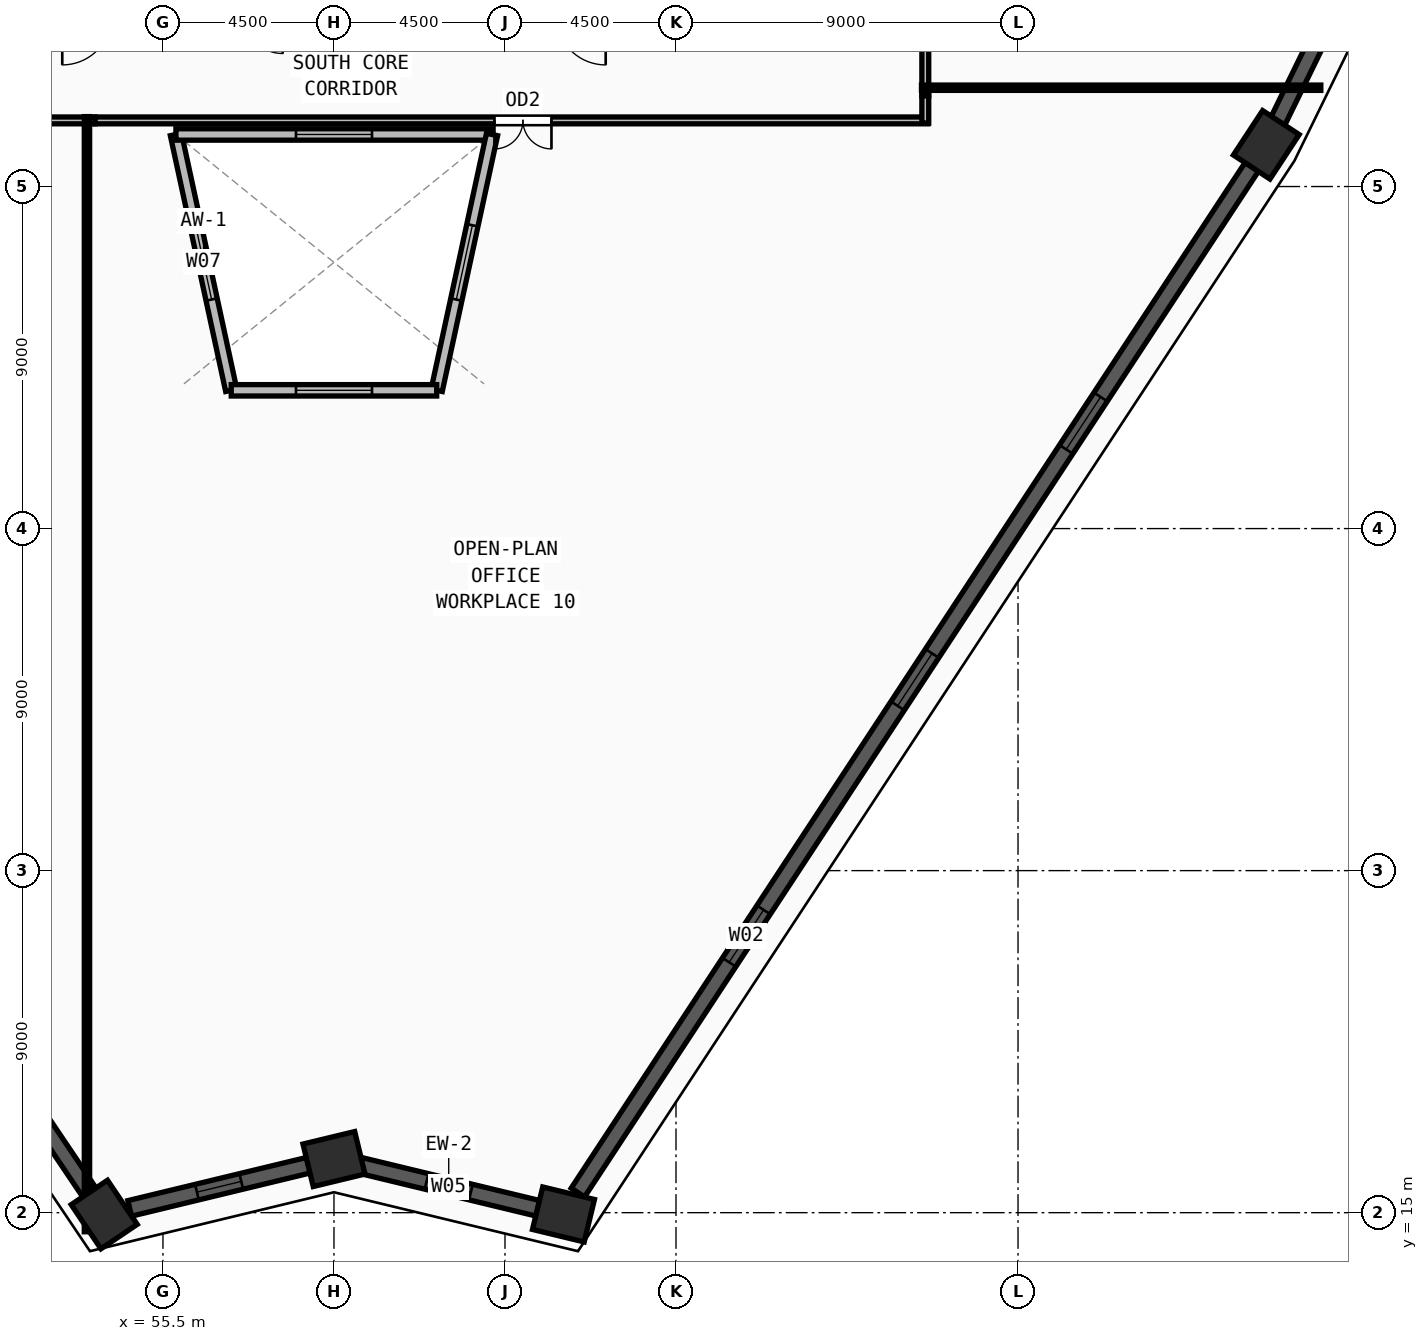
"""IFC4 building model, lengths in metres.
Left out: names, types, materials, properties, quantities, classifications, styles, units other than length and angle.
Written with IfcOpenShell. Run it as: python <this file> out.ifc"""

import sys

from ifc_helpers import new_model, si_unit, direction, frame, frame_2d, origin, origin_2d, place, context, subcontext, project, spatial, rectangle, extrude, source, transform, mapped, element, fill, save


model = new_model("IFC4")
c1 = context("Model", 3, precision=1e-05, world=origin(), true_north=direction((0.0, 1.0)))
c2 = subcontext(c1, "Body", "Model", "MODEL_VIEW")
j1 = project(units=[si_unit("LENGTHUNIT", "METRE"), si_unit("PLANEANGLEUNIT", "RADIAN")], contexts=[c1])
p1 = place(None, origin())
s1 = spatial("IfcSite", under=j1, at=p1, CompositionType="ELEMENT")
p2 = place(p1, origin())
s2 = spatial("IfcBuilding", under=s1, at=p2, CompositionType="ELEMENT")
p3 = place(p2, frame((0.0, 0.0, 102.0)))
s3 = spatial("IfcBuildingStorey", under=s2, at=p3, CompositionType="ELEMENT", Elevation=102.0)
m1 = source(origin(), c2, "Body", "SweptSolid", [
    extrude(rectangle(XDim=1.4, YDim=1.15, at=origin_2d()), origin(), (0.0, 0.0, 1.0), 3.75),
])
for number, where, z_axis, x_axis in (
    (1, (53.954, 14.951, 0.0), (0.0, 0.0, 1.0), (-0.559, 0.829, 0.0)),
    (2, (84.533, 43.098, 0.0), (0.0, 0.0, 1.0), (0.549, 0.836, 0.0)),
    (3, (66.039, 14.953, 0.0), (0.0, 0.0, 1.0), (-0.972, 0.235, 0.0)),
    (4, (60.0, 16.411, 0.0), (0.0, 0.0, 1.0), (0.972, 0.235, 0.0)),
):
    element("IfcColumn", number, at=place(p3, frame(where, z_axis=z_axis, x_axis=x_axis)), inside=s3, PredefinedType="COLUMN", context=c2, shape_type="MappedRepresentation", body=[
        mapped(m1, transform((0.0, 0.0, 0.0), x_axis=(1.0, 0.0, 0.0), y_axis=(0.0, 1.0, 0.0), z_axis=(0.0, 0.0, 1.0), scale=1.0)),
    ])
p4 = place(p3, frame((60.671, 16.249, 0.0), z_axis=(0.0, 0.0, 1.0), x_axis=(0.972069490492, -0.234693216037, 0.0)))
e5 = element("IfcWall", 5, at=p4, inside=s3, PredefinedType="SOLIDWALL", context=c2, shape_type="SweptSolid", body=[
    extrude(rectangle(XDim=4.832, YDim=0.42, at=frame_2d((2.416, 0.0))), origin(), (0.0, 0.0, 1.0), 3.57),
])
m2 = source(origin(), c2, "Body", "SweptSolid", [
    extrude(rectangle(XDim=1.2, YDim=1.9, at=frame_2d((0.6, 0.95))), frame((0.0, 0.22, 0.0), z_axis=(0.0, -1.0, 0.0), x_axis=(1.0, 0.0, 0.0)), (0.0, 0.0, 1.0), 0.44),
])
p5 = place(p4, frame((1.816, 0.0, 0.55)))
e6 = element("IfcOpeningElement", 6, at=p5, cuts=e5, PredefinedType="OPENING", context=c2, shape_type="MappedRepresentation", body=[
    mapped(m2, transform((0.0, 0.0, 0.0), x_axis=(1.0, 0.0, 0.0), y_axis=(0.0, 1.0, 0.0), z_axis=(0.0, 0.0, 1.0), scale=1.0)),
])
p6 = place(p3, frame((66.418, 15.53, 0.0), z_axis=(0.0, 0.0, 1.0), x_axis=(0.549159785608, 0.835717374398, 0.0)))
e7 = element("IfcWall", 7, at=p6, inside=s3, PredefinedType="SOLIDWALL", context=c2, shape_type="SweptSolid", body=[
    extrude(rectangle(XDim=32.297, YDim=0.42, at=frame_2d((16.148, 0.0))), origin(), (0.0, 0.0, 1.0), 3.57),
])
m3 = source(origin(), c2, "Body", "SweptSolid", [
    extrude(rectangle(XDim=1.65, YDim=1.95, at=frame_2d((0.825, 0.975))), frame((0.0, 0.22, 0.0), z_axis=(0.0, -1.0, 0.0), x_axis=(1.0, 0.0, 0.0)), (0.0, 0.0, 1.0), 0.44),
])
p7 = place(p6, frame((7.249, 0.0, 0.55)))
e8 = element("IfcOpeningElement", 8, at=p7, cuts=e7, PredefinedType="OPENING", context=c2, shape_type="MappedRepresentation", body=[
    mapped(m3, transform((0.0, 0.0, 0.0), x_axis=(1.0, 0.0, 0.0), y_axis=(0.0, 1.0, 0.0), z_axis=(0.0, 0.0, 1.0), scale=1.0)),
])
p8 = place(p6, frame((15.323, 0.0, 0.55)))
e9 = element("IfcOpeningElement", 9, at=p8, cuts=e7, PredefinedType="OPENING", context=c2, shape_type="MappedRepresentation", body=[
    mapped(m3, transform((0.0, 0.0, 0.0), x_axis=(1.0, 0.0, 0.0), y_axis=(0.0, 1.0, 0.0), z_axis=(0.0, 0.0, 1.0), scale=1.0)),
])
p9 = place(p6, frame((23.398, 0.0, 0.55)))
e10 = element("IfcOpeningElement", 10, at=p9, cuts=e7, PredefinedType="OPENING", context=c2, shape_type="MappedRepresentation", body=[
    mapped(m3, transform((0.0, 0.0, 0.0), x_axis=(1.0, 0.0, 0.0), y_axis=(0.0, 1.0, 0.0), z_axis=(0.0, 0.0, 1.0), scale=1.0)),
])
p10 = place(p3, frame((84.836, 43.718, 0.0), z_axis=(0.0, 0.0, 1.0), x_axis=(0.439006754844, 0.898483761234, 0.0)))
e11 = element("IfcWall", 11, at=p10, inside=s3, PredefinedType="SOLIDWALL", context=c2, shape_type="SweptSolid", body=[
    extrude(rectangle(XDim=26.656, YDim=0.42, at=frame_2d((13.328, 0.0))), origin(), (0.0, 0.0, 1.0), 3.57),
])
p11 = place(p10, frame((7.389, 0.0, 0.55)))
e12 = element("IfcOpeningElement", 12, at=p11, cuts=e11, PredefinedType="OPENING", context=c2, shape_type="MappedRepresentation", body=[
    mapped(m3, transform((0.0, 0.0, 0.0), x_axis=(1.0, 0.0, 0.0), y_axis=(0.0, 1.0, 0.0), z_axis=(0.0, 0.0, 1.0), scale=1.0)),
])
p12 = place(p10, frame((19.167, 0.0, 0.55)))
e13 = element("IfcOpeningElement", 13, at=p12, cuts=e11, PredefinedType="OPENING", context=c2, shape_type="MappedRepresentation", body=[
    mapped(m3, transform((0.0, 0.0, 0.0), x_axis=(1.0, 0.0, 0.0), y_axis=(0.0, 1.0, 0.0), z_axis=(0.0, 0.0, 1.0), scale=1.0)),
])
p13 = place(p3, frame((38.677, 37.633, 0.0), z_axis=(0.0, 0.0, 1.0), x_axis=(0.558641911568, -0.829408955004, 0.0)))
e14 = element("IfcWall", 14, at=p13, inside=s3, PredefinedType="SOLIDWALL", context=c2, shape_type="SweptSolid", body=[
    extrude(rectangle(XDim=26.658, YDim=0.42, at=frame_2d((13.329, 0.0))), origin(), (0.0, 0.0, 1.0), 3.57),
])
p14 = place(p13, frame((5.839, 0.0, 0.55)))
e15 = element("IfcOpeningElement", 15, at=p14, cuts=e14, PredefinedType="OPENING", context=c2, shape_type="MappedRepresentation", body=[
    mapped(m3, transform((0.0, 0.0, 0.0), x_axis=(1.0, 0.0, 0.0), y_axis=(0.0, 1.0, 0.0), z_axis=(0.0, 0.0, 1.0), scale=1.0)),
])
p15 = place(p13, frame((12.504, 0.0, 0.55)))
e16 = element("IfcOpeningElement", 16, at=p15, cuts=e14, PredefinedType="OPENING", context=c2, shape_type="MappedRepresentation", body=[
    mapped(m3, transform((0.0, 0.0, 0.0), x_axis=(1.0, 0.0, 0.0), y_axis=(0.0, 1.0, 0.0), z_axis=(0.0, 0.0, 1.0), scale=1.0)),
])
p16 = place(p13, frame((19.168, 0.0, 0.55)))
e17 = element("IfcOpeningElement", 17, at=p16, cuts=e14, PredefinedType="OPENING", context=c2, shape_type="MappedRepresentation", body=[
    mapped(m3, transform((0.0, 0.0, 0.0), x_axis=(1.0, 0.0, 0.0), y_axis=(0.0, 1.0, 0.0), z_axis=(0.0, 0.0, 1.0), scale=1.0)),
])
p17 = place(p3, frame((54.625, 15.113, 0.0), z_axis=(0.0, 0.0, 1.0), x_axis=(0.972057999052, 0.234740807016, 0.0)))
e18 = element("IfcWall", 18, at=p17, inside=s3, PredefinedType="SOLIDWALL", context=c2, shape_type="SweptSolid", body=[
    extrude(rectangle(XDim=4.839, YDim=0.42, at=frame_2d((2.42, 0.0))), origin(), (0.0, 0.0, 1.0), 3.57),
])
p18 = place(p17, frame((1.82, 0.0, 0.55)))
e19 = element("IfcOpeningElement", 19, at=p18, cuts=e18, PredefinedType="OPENING", context=c2, shape_type="MappedRepresentation", body=[
    mapped(m2, transform((0.0, 0.0, 0.0), x_axis=(1.0, 0.0, 0.0), y_axis=(0.0, 1.0, 0.0), z_axis=(0.0, 0.0, 1.0), scale=1.0)),
])
p19 = place(p3, frame((57.297, 36.638, 0.0), z_axis=(0.0, 0.0, 1.0), x_axis=(-0.211395025219, 0.977400707649, 0.0)))
e20 = element("IfcWall", 20, at=p19, inside=s3, PredefinedType="SOLIDWALL", context=c2, shape_type="SweptSolid", body=[
    extrude(rectangle(XDim=6.888, YDim=0.3, at=frame_2d((3.444, 0.0))), origin(), (0.0, 0.0, 1.0), 3.57),
])
m4 = source(origin(), c2, "Body", "SweptSolid", [
    extrude(rectangle(XDim=2.0, YDim=1.9, at=frame_2d((1.0, 0.95))), frame((0.0, 0.16, 0.0), z_axis=(0.0, -1.0, 0.0), x_axis=(1.0, 0.0, 0.0)), (0.0, 0.0, 1.0), 0.32),
])
p20 = place(p19, frame((2.444, 0.0, 0.55)))
e21 = element("IfcOpeningElement", 21, at=p20, cuts=e20, PredefinedType="OPENING", context=c2, shape_type="MappedRepresentation", body=[
    mapped(m4, transform((0.0, 0.0, 0.0), x_axis=(1.0, 0.0, 0.0), y_axis=(0.0, 1.0, 0.0), z_axis=(0.0, 0.0, 1.0), scale=1.0)),
])
p21 = place(p3, frame((55.841, 43.37, 0.0), z_axis=(0.0, 0.0, 1.0), x_axis=(1.0, 0.0, 0.0)))
e22 = element("IfcWall", 22, at=p21, inside=s3, PredefinedType="SOLIDWALL", context=c2, shape_type="SweptSolid", body=[
    extrude(rectangle(XDim=8.318, YDim=0.3, at=frame_2d((4.159, 0.0))), origin(), (0.0, 0.0, 1.0), 3.57),
])
p22 = place(p21, frame((3.159, 0.0, 0.55)))
e23 = element("IfcOpeningElement", 23, at=p22, cuts=e22, PredefinedType="OPENING", context=c2, shape_type="MappedRepresentation", body=[
    mapped(m4, transform((0.0, 0.0, 0.0), x_axis=(1.0, 0.0, 0.0), y_axis=(0.0, 1.0, 0.0), z_axis=(0.0, 0.0, 1.0), scale=1.0)),
])
p23 = place(p3, frame((64.159, 43.37, 0.0), z_axis=(0.0, 0.0, 1.0), x_axis=(-0.211395025219, -0.977400707649, 0.0)))
e24 = element("IfcWall", 24, at=p23, inside=s3, PredefinedType="SOLIDWALL", context=c2, shape_type="SweptSolid", body=[
    extrude(rectangle(XDim=6.888, YDim=0.3, at=frame_2d((3.444, 0.0))), origin(), (0.0, 0.0, 1.0), 3.57),
])
p24 = place(p23, frame((2.444, 0.0, 0.55)))
e25 = element("IfcOpeningElement", 25, at=p24, cuts=e24, PredefinedType="OPENING", context=c2, shape_type="MappedRepresentation", body=[
    mapped(m4, transform((0.0, 0.0, 0.0), x_axis=(1.0, 0.0, 0.0), y_axis=(0.0, 1.0, 0.0), z_axis=(0.0, 0.0, 1.0), scale=1.0)),
])
p25 = place(p3, frame((62.703, 36.638, 0.0), z_axis=(0.0, 0.0, 1.0), x_axis=(-1.0, 0.0, 0.0)))
e26 = element("IfcWall", 26, at=p25, inside=s3, PredefinedType="SOLIDWALL", context=c2, shape_type="SweptSolid", body=[
    extrude(rectangle(XDim=5.406, YDim=0.3, at=frame_2d((2.703, 0.0))), origin(), (0.0, 0.0, 1.0), 3.57),
])
p26 = place(p25, frame((1.703, 0.0, 0.55)))
e27 = element("IfcOpeningElement", 27, at=p26, cuts=e26, PredefinedType="OPENING", context=c2, shape_type="MappedRepresentation", body=[
    mapped(m4, transform((0.0, 0.0, 0.0), x_axis=(1.0, 0.0, 0.0), y_axis=(0.0, 1.0, 0.0), z_axis=(0.0, 0.0, 1.0), scale=1.0)),
])
p27 = place(p3, frame((53.715, 43.74, 0.0), z_axis=(0.0, 0.0, 1.0), x_axis=(-1.0, 0.0, 0.0)))
e28 = element("IfcWall", 28, at=p27, inside=s3, PredefinedType="PARTITIONING", context=c2, shape_type="SweptSolid", body=[
    extrude(rectangle(XDim=9.345, YDim=0.18, at=frame_2d((4.672, 0.0))), origin(), (0.0, 0.0, 1.0), 3.57),
])
m5 = source(origin(), c2, "Body", "SweptSolid", [
    extrude(rectangle(XDim=1.5, YDim=2.2, at=frame_2d((0.75, 1.1))), frame((0.0, 0.1, 0.0), z_axis=(0.0, -1.0, 0.0), x_axis=(1.0, 0.0, 0.0)), (0.0, 0.0, 1.0), 0.2),
])
p28 = place(p27, frame((3.923, 0.0, 0.0)))
e29 = element("IfcOpeningElement", 29, at=p28, cuts=e28, PredefinedType="OPENING", context=c2, shape_type="MappedRepresentation", body=[
    mapped(m5, transform((0.0, 0.0, 0.0), x_axis=(1.0, 0.0, 0.0), y_axis=(0.0, 1.0, 0.0), z_axis=(0.0, 0.0, 1.0), scale=1.0)),
])
p29 = place(p3, frame((75.63, 43.74, 0.0), z_axis=(0.0, 0.0, 1.0), x_axis=(-1.0, 0.0, 0.0)))
e30 = element("IfcWall", 30, at=p29, inside=s3, PredefinedType="PARTITIONING", context=c2, shape_type="SweptSolid", body=[
    extrude(rectangle(XDim=21.915, YDim=0.18, at=frame_2d((10.958, 0.0))), origin(), (0.0, 0.0, 1.0), 3.57),
])
p30 = place(p29, frame((9.907, 0.0, 0.0)))
e31 = element("IfcOpeningElement", 31, at=p30, cuts=e30, PredefinedType="OPENING", context=c2, shape_type="MappedRepresentation", body=[
    mapped(m5, transform((0.0, 0.0, 0.0), x_axis=(1.0, 0.0, 0.0), y_axis=(0.0, 1.0, 0.0), z_axis=(0.0, 0.0, 1.0), scale=1.0)),
])
p31 = place(p3, frame((75.56, 49.215, 0.0), z_axis=(0.0, 0.0, 1.0), x_axis=(0.0, -1.0, 0.0)))
e32 = element("IfcWall", 32, at=p31, inside=s3, PredefinedType="PARTITIONING", context=c2, shape_type="SweptSolid", body=[
    extrude(rectangle(XDim=4.83, YDim=0.18, at=frame_2d((2.415, 0.0))), origin(), (0.0, 0.0, 1.0), 3.57),
])
m6 = source(origin(), c2, "Body", "SweptSolid", [
    extrude(rectangle(XDim=1.0, YDim=2.2, at=frame_2d((0.5, 1.1))), frame((0.0, 0.1, 0.0), z_axis=(0.0, -1.0, 0.0), x_axis=(1.0, 0.0, 0.0)), (0.0, 0.0, 1.0), 0.2),
])
p32 = place(p31, frame((1.915, 0.0, 0.0)))
e33 = element("IfcOpeningElement", 33, at=p32, cuts=e32, PredefinedType="OPENING", context=c2, shape_type="MappedRepresentation", body=[
    mapped(m6, transform((0.0, 0.0, 0.0), x_axis=(1.0, 0.0, 0.0), y_axis=(0.0, 1.0, 0.0), z_axis=(0.0, 0.0, 1.0), scale=1.0)),
])
p33 = place(p3, frame((75.56, 44.385, 0.0), z_axis=(0.0, 0.0, 1.0), x_axis=(0.0, -1.0, 0.0)))
e34 = element("IfcWall", 34, at=p33, inside=s3, PredefinedType="PARTITIONING", context=c2, shape_type="SweptSolid", body=[
    extrude(rectangle(XDim=0.715, YDim=0.18, at=frame_2d((0.357, 0.0))), origin(), (0.0, 0.0, 1.0), 3.57),
])
p34 = place(p3, frame((75.46, 44.6, 0.0), z_axis=(0.0, 0.0, 1.0), x_axis=(1.0, 0.0, 0.0)))
e35 = element("IfcWall", 35, at=p34, inside=s3, PredefinedType="PARTITIONING", context=c2, shape_type="SweptSolid", body=[
    extrude(rectangle(XDim=10.508, YDim=0.14, at=frame_2d((5.254, 0.0))), origin(), (0.0, 0.0, 1.0), 3.57),
])
p35 = place(p3, frame((53.5, 43.84, 0.0), z_axis=(0.0, 0.0, 1.0), x_axis=(0.0, -1.0, 0.0)))
e36 = element("IfcWall", 36, at=p35, inside=s3, PredefinedType="PARTITIONING", context=c2, shape_type="SweptSolid", body=[
    extrude(rectangle(XDim=29.343, YDim=0.14, at=frame_2d((14.671, 0.0))), origin(), (0.0, 0.0, 1.0), 2.755),
])
m7 = source(origin(), c2, "Body", "SweptSolid", [
    extrude(rectangle(XDim=1.2, YDim=1.9, at=frame_2d((0.6, 0.95))), frame((0.0, 0.03, 0.0), z_axis=(0.0, -1.0, 0.0), x_axis=(1.0, 0.0, 0.0)), (0.0, 0.0, 1.0), 0.06),
])
p36 = place(p5, origin())
e37 = element("IfcWindow", 37, at=p36, inside=s3, PartitioningType="SINGLE_PANEL", PredefinedType="WINDOW", context=c2, shape_type="MappedRepresentation", body=[
    mapped(m7, transform((0.0, 0.0, 0.0), x_axis=(1.0, 0.0, 0.0), y_axis=(0.0, 1.0, 0.0), z_axis=(0.0, 0.0, 1.0), scale=1.0)),
])
fill(e6, e37)
m8 = source(origin(), c2, "Body", "SweptSolid", [
    extrude(rectangle(XDim=1.65, YDim=1.95, at=frame_2d((0.825, 0.975))), frame((0.0, 0.03, 0.0), z_axis=(0.0, -1.0, 0.0), x_axis=(1.0, 0.0, 0.0)), (0.0, 0.0, 1.0), 0.06),
])
p37 = place(p7, origin())
e38 = element("IfcWindow", 38, at=p37, inside=s3, PartitioningType="DOUBLE_PANEL_VERTICAL", PredefinedType="WINDOW", context=c2, shape_type="MappedRepresentation", body=[
    mapped(m8, transform((0.0, 0.0, 0.0), x_axis=(1.0, 0.0, 0.0), y_axis=(0.0, 1.0, 0.0), z_axis=(0.0, 0.0, 1.0), scale=1.0)),
])
fill(e8, e38)
p38 = place(p8, origin())
e39 = element("IfcWindow", 39, at=p38, inside=s3, PartitioningType="DOUBLE_PANEL_VERTICAL", PredefinedType="WINDOW", context=c2, shape_type="MappedRepresentation", body=[
    mapped(m8, transform((0.0, 0.0, 0.0), x_axis=(1.0, 0.0, 0.0), y_axis=(0.0, 1.0, 0.0), z_axis=(0.0, 0.0, 1.0), scale=1.0)),
])
fill(e9, e39)
p39 = place(p9, origin())
e40 = element("IfcWindow", 40, at=p39, inside=s3, PartitioningType="DOUBLE_PANEL_VERTICAL", PredefinedType="WINDOW", context=c2, shape_type="MappedRepresentation", body=[
    mapped(m8, transform((0.0, 0.0, 0.0), x_axis=(1.0, 0.0, 0.0), y_axis=(0.0, 1.0, 0.0), z_axis=(0.0, 0.0, 1.0), scale=1.0)),
])
fill(e10, e40)
p40 = place(p18, origin())
e41 = element("IfcWindow", 41, at=p40, inside=s3, PartitioningType="SINGLE_PANEL", PredefinedType="WINDOW", context=c2, shape_type="MappedRepresentation", body=[
    mapped(m7, transform((0.0, 0.0, 0.0), x_axis=(1.0, 0.0, 0.0), y_axis=(0.0, 1.0, 0.0), z_axis=(0.0, 0.0, 1.0), scale=1.0)),
])
fill(e19, e41)
m9 = source(origin(), c2, "Body", "SweptSolid", [
    extrude(rectangle(XDim=2.0, YDim=1.9, at=frame_2d((1.0, 0.95))), frame((0.0, 0.03, 0.0), z_axis=(0.0, -1.0, 0.0), x_axis=(1.0, 0.0, 0.0)), (0.0, 0.0, 1.0), 0.06),
])
p41 = place(p20, origin())
e42 = element("IfcWindow", 42, at=p41, inside=s3, PartitioningType="DOUBLE_PANEL_VERTICAL", PredefinedType="WINDOW", context=c2, shape_type="MappedRepresentation", body=[
    mapped(m9, transform((0.0, 0.0, 0.0), x_axis=(1.0, 0.0, 0.0), y_axis=(0.0, 1.0, 0.0), z_axis=(0.0, 0.0, 1.0), scale=1.0)),
])
fill(e21, e42)
p42 = place(p22, origin())
e43 = element("IfcWindow", 43, at=p42, inside=s3, PartitioningType="DOUBLE_PANEL_VERTICAL", PredefinedType="WINDOW", context=c2, shape_type="MappedRepresentation", body=[
    mapped(m9, transform((0.0, 0.0, 0.0), x_axis=(1.0, 0.0, 0.0), y_axis=(0.0, 1.0, 0.0), z_axis=(0.0, 0.0, 1.0), scale=1.0)),
])
fill(e23, e43)
p43 = place(p24, origin())
e44 = element("IfcWindow", 44, at=p43, inside=s3, PartitioningType="DOUBLE_PANEL_VERTICAL", PredefinedType="WINDOW", context=c2, shape_type="MappedRepresentation", body=[
    mapped(m9, transform((0.0, 0.0, 0.0), x_axis=(1.0, 0.0, 0.0), y_axis=(0.0, 1.0, 0.0), z_axis=(0.0, 0.0, 1.0), scale=1.0)),
])
fill(e25, e44)
p44 = place(p26, origin())
e45 = element("IfcWindow", 45, at=p44, inside=s3, PartitioningType="DOUBLE_PANEL_VERTICAL", PredefinedType="WINDOW", context=c2, shape_type="MappedRepresentation", body=[
    mapped(m9, transform((0.0, 0.0, 0.0), x_axis=(1.0, 0.0, 0.0), y_axis=(0.0, 1.0, 0.0), z_axis=(0.0, 0.0, 1.0), scale=1.0)),
])
fill(e27, e45)
m10 = source(origin(), c2, "Body", "SweptSolid", [
    extrude(rectangle(XDim=1.5, YDim=2.2, at=frame_2d((0.75, 1.1))), frame((0.0, 0.025, 0.0), z_axis=(0.0, -1.0, 0.0), x_axis=(1.0, 0.0, 0.0)), (0.0, 0.0, 1.0), 0.05),
])
p45 = place(p30, origin())
e46 = element("IfcDoor", 46, at=p45, inside=s3, OperationType="DOUBLE_DOOR_SINGLE_SWING", PredefinedType="DOOR", context=c2, shape_type="MappedRepresentation", body=[
    mapped(m10, transform((0.0, 0.0, 0.0), x_axis=(1.0, 0.0, 0.0), y_axis=(0.0, 1.0, 0.0), z_axis=(0.0, 0.0, 1.0), scale=1.0)),
])
fill(e31, e46)
save(model, sys.argv[1])
